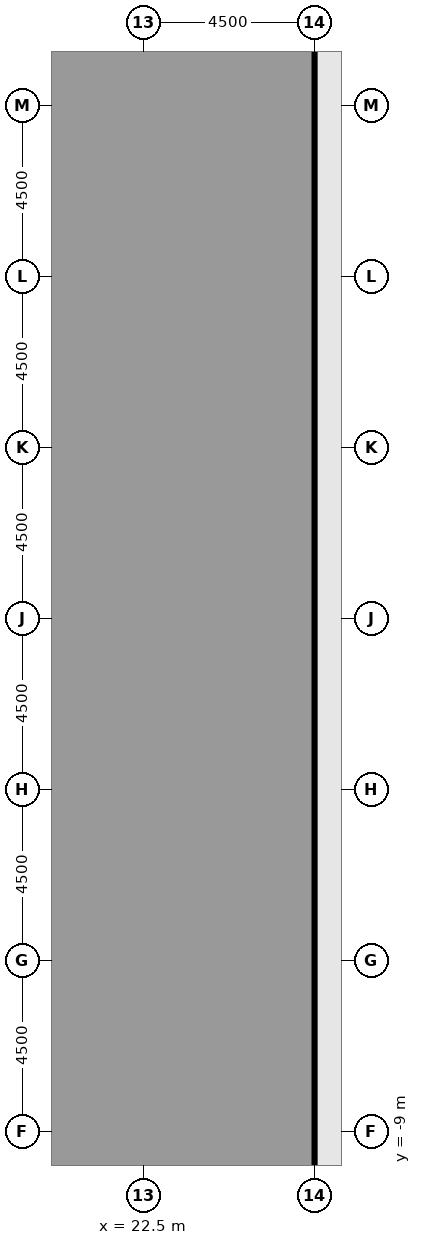
"""IFC4 building model, lengths in metres.
Left out: names, types, materials, properties, quantities, classifications, styles, units other than length and angle.
Written with IfcOpenShell. Run it as: python <this file> out.ifc"""

import sys

from ifc_helpers import new_model, si_unit, direction, frame, frame_2d, origin, origin_2d, place, context, subcontext, project, spatial, rectangle, extrude, element, fill, save


model = new_model("IFC4")
c1 = context("Model", 3, precision=1e-05, world=origin(), true_north=direction((0.0, 1.0)))
c2 = subcontext(c1, "Body", "Model", "MODEL_VIEW")
j1 = project(units=[si_unit("LENGTHUNIT", "METRE"), si_unit("PLANEANGLEUNIT", "RADIAN")], contexts=[c1])
p1 = place(None, origin())
s1 = spatial("IfcSite", under=j1, at=p1, CompositionType="ELEMENT")
p2 = place(p1, origin())
s2 = spatial("IfcBuilding", under=s1, at=p2, CompositionType="ELEMENT")
p3 = place(p2, frame((0.0, 0.0, 7.2)))
s3 = spatial("IfcBuildingStorey", under=s2, at=p3, CompositionType="ELEMENT", Elevation=7.2)
for number, where, z_axis, x_axis in (
    (1, (27.0, -9.0, -0.45), (0.0, 0.0, 1.0), (1.0, 0.0, 0.0)),
    (2, (27.0, -4.5, -0.45), (0.0, 0.0, 1.0), (1.0, 0.0, 0.0)),
    (3, (27.0, 0.0, -0.45), (0.0, 0.0, 1.0), (1.0, 0.0, 0.0)),
    (4, (27.0, 4.5, -0.45), (0.0, 0.0, 1.0), (1.0, 0.0, 0.0)),
    (5, (27.0, 9.0, -0.45), (0.0, 0.0, 1.0), (1.0, 0.0, 0.0)),
    (6, (27.0, 13.5, -0.45), (0.0, 0.0, 1.0), (1.0, 0.0, 0.0)),
    (7, (27.0, 18.0, -0.45), (0.0, 0.0, 1.0), (1.0, 0.0, 0.0)),
):
    element("IfcColumn", number, at=place(p3, frame(where, z_axis=z_axis, x_axis=x_axis)), inside=s3, PredefinedType="COLUMN", context=c2, shape_type="SweptSolid", body=[
        extrude(rectangle(XDim=1.4, YDim=1.4, at=origin_2d()), origin(), (0.0, 0.0, 1.0), 4.55),
    ])
for number, where, z_axis, x_axis in (
    (8, (22.5, -9.0, 0.0), (0.0, 0.0, 1.0), (1.0, 0.0, 0.0)),
    (9, (22.5, 0.0, 0.0), (0.0, 0.0, 1.0), (1.0, 0.0, 0.0)),
    (10, (22.5, 9.0, 0.0), (0.0, 0.0, 1.0), (1.0, 0.0, 0.0)),
    (11, (22.5, 18.0, 0.0), (0.0, 0.0, 1.0), (1.0, 0.0, 0.0)),
):
    element("IfcColumn", number, at=place(p3, frame(where, z_axis=z_axis, x_axis=x_axis)), inside=s3, PredefinedType="COLUMN", context=c2, shape_type="SweptSolid", body=[
        extrude(rectangle(XDim=1.6, YDim=1.6, at=origin_2d()), origin(), (0.0, 0.0, 1.0), 4.1),
    ])
p4 = place(p3, frame((27.0, -9.7, 0.0), z_axis=(0.0, 0.0, 1.0), x_axis=(0.0, -1.0, 0.0)))
e12 = element("IfcWall", 12, at=p4, inside=s3, PredefinedType="SOLIDWALL", context=c2, shape_type="SweptSolid", body=[
    extrude(rectangle(XDim=3.1, YDim=0.3, at=frame_2d((1.55, 0.0))), origin(), (0.0, 0.0, 1.0), 2.75),
])
p5 = place(p4, frame((0.475, 0.0, 0.8)))
e13 = element("IfcOpeningElement", 13, at=p5, cuts=e12, PredefinedType="OPENING", context=c2, shape_type="SweptSolid", body=[
    extrude(rectangle(XDim=1.2, YDim=1.7, at=frame_2d((0.6, 0.85))), frame((0.0, 0.16, 0.0), z_axis=(0.0, -1.0, 0.0), x_axis=(1.0, 0.0, 0.0)), (0.0, 0.0, 1.0), 0.32),
])
p6 = place(p3, frame((27.0, -5.2, 0.0), z_axis=(0.0, 0.0, 1.0), x_axis=(0.0, -1.0, 0.0)))
e14 = element("IfcWall", 14, at=p6, inside=s3, PredefinedType="SOLIDWALL", context=c2, shape_type="SweptSolid", body=[
    extrude(rectangle(XDim=3.1, YDim=0.3, at=frame_2d((1.55, 0.0))), origin(), (0.0, 0.0, 1.0), 2.75),
])
p7 = place(p6, frame((0.35, 0.0, 0.8)))
e15 = element("IfcOpeningElement", 15, at=p7, cuts=e14, PredefinedType="OPENING", context=c2, shape_type="SweptSolid", body=[
    extrude(rectangle(XDim=2.4, YDim=1.7, at=frame_2d((1.2, 0.85))), frame((0.0, 0.16, 0.0), z_axis=(0.0, -1.0, 0.0), x_axis=(1.0, 0.0, 0.0)), (0.0, 0.0, 1.0), 0.32),
])
p8 = place(p3, frame((27.0, -0.7, 0.0), z_axis=(0.0, 0.0, 1.0), x_axis=(0.0, -1.0, 0.0)))
e16 = element("IfcWall", 16, at=p8, inside=s3, PredefinedType="SOLIDWALL", context=c2, shape_type="SweptSolid", body=[
    extrude(rectangle(XDim=3.1, YDim=0.3, at=frame_2d((1.55, 0.0))), origin(), (0.0, 0.0, 1.0), 2.75),
])
p9 = place(p8, frame((0.35, 0.0, 0.8)))
e17 = element("IfcOpeningElement", 17, at=p9, cuts=e16, PredefinedType="OPENING", context=c2, shape_type="SweptSolid", body=[
    extrude(rectangle(XDim=2.4, YDim=1.7, at=frame_2d((1.2, 0.85))), frame((0.0, 0.16, 0.0), z_axis=(0.0, -1.0, 0.0), x_axis=(1.0, 0.0, 0.0)), (0.0, 0.0, 1.0), 0.32),
])
p10 = place(p3, frame((27.0, 3.8, 0.0), z_axis=(0.0, 0.0, 1.0), x_axis=(0.0, -1.0, 0.0)))
e18 = element("IfcWall", 18, at=p10, inside=s3, PredefinedType="SOLIDWALL", context=c2, shape_type="SweptSolid", body=[
    extrude(rectangle(XDim=3.1, YDim=0.3, at=frame_2d((1.55, 0.0))), origin(), (0.0, 0.0, 1.0), 2.75),
])
p11 = place(p10, frame((0.35, 0.0, 0.8)))
e19 = element("IfcOpeningElement", 19, at=p11, cuts=e18, PredefinedType="OPENING", context=c2, shape_type="SweptSolid", body=[
    extrude(rectangle(XDim=2.4, YDim=1.7, at=frame_2d((1.2, 0.85))), frame((0.0, 0.16, 0.0), z_axis=(0.0, -1.0, 0.0), x_axis=(1.0, 0.0, 0.0)), (0.0, 0.0, 1.0), 0.32),
])
p12 = place(p3, frame((27.0, 8.3, 0.0), z_axis=(0.0, 0.0, 1.0), x_axis=(0.0, -1.0, 0.0)))
e20 = element("IfcWall", 20, at=p12, inside=s3, PredefinedType="SOLIDWALL", context=c2, shape_type="SweptSolid", body=[
    extrude(rectangle(XDim=3.1, YDim=0.3, at=frame_2d((1.55, 0.0))), origin(), (0.0, 0.0, 1.0), 2.75),
])
p13 = place(p12, frame((0.35, 0.0, 0.8)))
e21 = element("IfcOpeningElement", 21, at=p13, cuts=e20, PredefinedType="OPENING", context=c2, shape_type="SweptSolid", body=[
    extrude(rectangle(XDim=2.4, YDim=1.7, at=frame_2d((1.2, 0.85))), frame((0.0, 0.16, 0.0), z_axis=(0.0, -1.0, 0.0), x_axis=(1.0, 0.0, 0.0)), (0.0, 0.0, 1.0), 0.32),
])
p14 = place(p3, frame((27.0, 12.8, 0.0), z_axis=(0.0, 0.0, 1.0), x_axis=(0.0, -1.0, 0.0)))
e22 = element("IfcWall", 22, at=p14, inside=s3, PredefinedType="SOLIDWALL", context=c2, shape_type="SweptSolid", body=[
    extrude(rectangle(XDim=3.1, YDim=0.3, at=frame_2d((1.55, 0.0))), origin(), (0.0, 0.0, 1.0), 2.75),
])
p15 = place(p14, frame((0.35, 0.0, 0.8)))
e23 = element("IfcOpeningElement", 23, at=p15, cuts=e22, PredefinedType="OPENING", context=c2, shape_type="SweptSolid", body=[
    extrude(rectangle(XDim=2.4, YDim=1.7, at=frame_2d((1.2, 0.85))), frame((0.0, 0.16, 0.0), z_axis=(0.0, -1.0, 0.0), x_axis=(1.0, 0.0, 0.0)), (0.0, 0.0, 1.0), 0.32),
])
p16 = place(p3, frame((27.0, 17.3, 0.0), z_axis=(0.0, 0.0, 1.0), x_axis=(0.0, -1.0, 0.0)))
e24 = element("IfcWall", 24, at=p16, inside=s3, PredefinedType="SOLIDWALL", context=c2, shape_type="SweptSolid", body=[
    extrude(rectangle(XDim=3.1, YDim=0.3, at=frame_2d((1.55, 0.0))), origin(), (0.0, 0.0, 1.0), 2.75),
])
p17 = place(p16, frame((1.05, 0.0, 0.0)))
e25 = element("IfcOpeningElement", 25, at=p17, cuts=e24, PredefinedType="OPENING", context=c2, shape_type="SweptSolid", body=[
    extrude(rectangle(XDim=1.0, YDim=2.2, at=frame_2d((0.5, 1.1))), frame((0.0, 0.16, 0.0), z_axis=(0.0, -1.0, 0.0), x_axis=(1.0, 0.0, 0.0)), (0.0, 0.0, 1.0), 0.32),
])
p18 = place(p3, frame((27.0, 21.8, 0.0), z_axis=(0.0, 0.0, 1.0), x_axis=(0.0, -1.0, 0.0)))
e26 = element("IfcWall", 26, at=p18, inside=s3, PredefinedType="SOLIDWALL", context=c2, shape_type="SweptSolid", body=[
    extrude(rectangle(XDim=3.1, YDim=0.3, at=frame_2d((1.55, 0.0))), origin(), (0.0, 0.0, 1.0), 2.75),
])
p19 = place(p18, frame((0.575, 0.0, 0.8)))
e27 = element("IfcOpeningElement", 27, at=p19, cuts=e26, PredefinedType="OPENING", context=c2, shape_type="SweptSolid", body=[
    extrude(rectangle(XDim=2.4, YDim=1.7, at=frame_2d((1.2, 0.85))), frame((0.0, 0.16, 0.0), z_axis=(0.0, -1.0, 0.0), x_axis=(1.0, 0.0, 0.0)), (0.0, 0.0, 1.0), 0.32),
])
p20 = place(p3, frame((21.0, 18.5, 0.0), z_axis=(0.0, 0.0, 1.0), x_axis=(0.0, -1.0, 0.0)))
e28 = element("IfcWall", 28, at=p20, inside=s3, PredefinedType="PARTITIONING", context=c2, shape_type="SweptSolid", body=[
    extrude(rectangle(XDim=27.5, YDim=0.2, at=frame_2d((13.75, 0.0))), origin(), (0.0, 0.0, 1.0), 3.65),
])
p21 = place(p20, frame((21.9, 0.0, 0.0)))
e29 = element("IfcOpeningElement", 29, at=p21, cuts=e28, PredefinedType="OPENING", context=c2, shape_type="SweptSolid", body=[
    extrude(rectangle(XDim=1.0, YDim=2.1, at=frame_2d((0.5, 1.05))), frame((0.0, 0.11, 0.0), z_axis=(0.0, -1.0, 0.0), x_axis=(1.0, 0.0, 0.0)), (0.0, 0.0, 1.0), 0.22),
])
p22 = place(p20, frame((10.4, 0.0, 0.0)))
e30 = element("IfcOpeningElement", 30, at=p22, cuts=e28, PredefinedType="OPENING", context=c2, shape_type="SweptSolid", body=[
    extrude(rectangle(XDim=1.0, YDim=2.1, at=frame_2d((0.5, 1.05))), frame((0.0, 0.11, 0.0), z_axis=(0.0, -1.0, 0.0), x_axis=(1.0, 0.0, 0.0)), (0.0, 0.0, 1.0), 0.22),
])
p23 = place(p3, frame((21.0, -9.0, 0.0), z_axis=(0.0, 0.0, 1.0), x_axis=(1.0, 0.0, 0.0)))
e31 = element("IfcWall", 31, at=p23, inside=s3, PredefinedType="PARTITIONING", context=c2, shape_type="SweptSolid", body=[
    extrude(rectangle(XDim=0.7, YDim=0.2, at=frame_2d((0.35, 0.0))), origin(), (0.0, 0.0, 1.0), 3.65),
])
p24 = place(p3, frame((23.3, -9.0, 0.0), z_axis=(0.0, 0.0, 1.0), x_axis=(1.0, 0.0, 0.0)))
e32 = element("IfcWall", 32, at=p24, inside=s3, PredefinedType="PARTITIONING", context=c2, shape_type="SweptSolid", body=[
    extrude(rectangle(XDim=3.0, YDim=0.2, at=frame_2d((1.5, 0.0))), origin(), (0.0, 0.0, 1.0), 3.65),
])
p25 = place(p3, frame((21.0, 0.0, 0.0), z_axis=(0.0, 0.0, 1.0), x_axis=(1.0, 0.0, 0.0)))
e33 = element("IfcWall", 33, at=p25, inside=s3, PredefinedType="PARTITIONING", context=c2, shape_type="SweptSolid", body=[
    extrude(rectangle(XDim=0.7, YDim=0.2, at=frame_2d((0.35, 0.0))), origin(), (0.0, 0.0, 1.0), 3.65),
])
p26 = place(p3, frame((23.3, 0.0, 0.0), z_axis=(0.0, 0.0, 1.0), x_axis=(1.0, 0.0, 0.0)))
e34 = element("IfcWall", 34, at=p26, inside=s3, PredefinedType="PARTITIONING", context=c2, shape_type="SweptSolid", body=[
    extrude(rectangle(XDim=3.0, YDim=0.2, at=frame_2d((1.5, 0.0))), origin(), (0.0, 0.0, 1.0), 3.65),
])
p27 = place(p3, frame((21.0, 13.5, 0.0), z_axis=(0.0, 0.0, 1.0), x_axis=(1.0, 0.0, 0.0)))
e35 = element("IfcWall", 35, at=p27, inside=s3, PredefinedType="PARTITIONING", context=c2, shape_type="SweptSolid", body=[
    extrude(rectangle(XDim=5.3, YDim=0.2, at=frame_2d((2.65, 0.0))), origin(), (0.0, 0.0, 1.0), 3.65),
])
p28 = place(p3, frame((21.0, 18.5, 0.0), z_axis=(0.0, 0.0, 1.0), x_axis=(1.0, 0.0, 0.0)))
e36 = element("IfcWall", 36, at=p28, inside=s3, PredefinedType="PARTITIONING", context=c2, shape_type="SweptSolid", body=[
    extrude(rectangle(XDim=0.7, YDim=0.2, at=frame_2d((0.35, 0.0))), origin(), (0.0, 0.0, 1.0), 3.65),
])
p29 = place(p3, frame((26.3, 18.5, 0.0), z_axis=(0.0, 0.0, 1.0), x_axis=(-1.0, 0.0, 0.0)))
e37 = element("IfcWall", 37, at=p29, inside=s3, PredefinedType="PARTITIONING", context=c2, shape_type="SweptSolid", body=[
    extrude(rectangle(XDim=3.0, YDim=0.2, at=frame_2d((1.5, 0.0))), origin(), (0.0, 0.0, 1.0), 3.65),
])
p30 = place(p29, frame((1.7, 0.0, 0.0)))
e38 = element("IfcOpeningElement", 38, at=p30, cuts=e37, PredefinedType="OPENING", context=c2, shape_type="SweptSolid", body=[
    extrude(rectangle(XDim=1.0, YDim=2.1, at=frame_2d((0.5, 1.05))), frame((0.0, 0.11, 0.0), z_axis=(0.0, -1.0, 0.0), x_axis=(1.0, 0.0, 0.0)), (0.0, 0.0, 1.0), 0.22),
])
p31 = place(p7, origin())
e39 = element("IfcWindow", 39, at=p31, inside=s3, PartitioningType="SINGLE_PANEL", PredefinedType="WINDOW", context=c2, shape_type="SweptSolid", body=[
    extrude(rectangle(XDim=2.4, YDim=1.7, at=frame_2d((1.2, 0.85))), frame((0.0, 0.03, 0.0), z_axis=(0.0, -1.0, 0.0), x_axis=(1.0, 0.0, 0.0)), (0.0, 0.0, 1.0), 0.06),
])
fill(e15, e39)
p32 = place(p9, origin())
e40 = element("IfcWindow", 40, at=p32, inside=s3, PartitioningType="SINGLE_PANEL", PredefinedType="WINDOW", context=c2, shape_type="SweptSolid", body=[
    extrude(rectangle(XDim=2.4, YDim=1.7, at=frame_2d((1.2, 0.85))), frame((0.0, 0.03, 0.0), z_axis=(0.0, -1.0, 0.0), x_axis=(1.0, 0.0, 0.0)), (0.0, 0.0, 1.0), 0.06),
])
fill(e17, e40)
p33 = place(p11, origin())
e41 = element("IfcWindow", 41, at=p33, inside=s3, PartitioningType="SINGLE_PANEL", PredefinedType="WINDOW", context=c2, shape_type="SweptSolid", body=[
    extrude(rectangle(XDim=2.4, YDim=1.7, at=frame_2d((1.2, 0.85))), frame((0.0, 0.03, 0.0), z_axis=(0.0, -1.0, 0.0), x_axis=(1.0, 0.0, 0.0)), (0.0, 0.0, 1.0), 0.06),
])
fill(e19, e41)
p34 = place(p13, origin())
e42 = element("IfcWindow", 42, at=p34, inside=s3, PartitioningType="SINGLE_PANEL", PredefinedType="WINDOW", context=c2, shape_type="SweptSolid", body=[
    extrude(rectangle(XDim=2.4, YDim=1.7, at=frame_2d((1.2, 0.85))), frame((0.0, 0.03, 0.0), z_axis=(0.0, -1.0, 0.0), x_axis=(1.0, 0.0, 0.0)), (0.0, 0.0, 1.0), 0.06),
])
fill(e21, e42)
p35 = place(p15, origin())
e43 = element("IfcWindow", 43, at=p35, inside=s3, PartitioningType="SINGLE_PANEL", PredefinedType="WINDOW", context=c2, shape_type="SweptSolid", body=[
    extrude(rectangle(XDim=2.4, YDim=1.7, at=frame_2d((1.2, 0.85))), frame((0.0, 0.03, 0.0), z_axis=(0.0, -1.0, 0.0), x_axis=(1.0, 0.0, 0.0)), (0.0, 0.0, 1.0), 0.06),
])
fill(e23, e43)
p36 = place(p17, origin())
e44 = element("IfcDoor", 44, at=p36, inside=s3, OperationType="SINGLE_SWING_RIGHT", PredefinedType="DOOR", context=c2, shape_type="SweptSolid", body=[
    extrude(rectangle(XDim=1.0, YDim=2.2, at=frame_2d((0.5, 1.1))), frame((0.0, 0.025, 0.0), z_axis=(0.0, -1.0, 0.0), x_axis=(1.0, 0.0, 0.0)), (0.0, 0.0, 1.0), 0.05),
])
fill(e25, e44)
p37 = place(p19, origin())
e45 = element("IfcWindow", 45, at=p37, inside=s3, PartitioningType="SINGLE_PANEL", PredefinedType="WINDOW", context=c2, shape_type="SweptSolid", body=[
    extrude(rectangle(XDim=2.4, YDim=1.7, at=frame_2d((1.2, 0.85))), frame((0.0, 0.03, 0.0), z_axis=(0.0, -1.0, 0.0), x_axis=(1.0, 0.0, 0.0)), (0.0, 0.0, 1.0), 0.06),
])
fill(e27, e45)
p38 = place(p30, origin())
e46 = element("IfcDoor", 46, at=p38, inside=s3, OperationType="SINGLE_SWING_RIGHT", PredefinedType="DOOR", context=c2, shape_type="SweptSolid", body=[
    extrude(rectangle(XDim=1.0, YDim=2.1, at=frame_2d((0.5, 1.05))), frame((0.0, 0.025, 0.0), z_axis=(0.0, -1.0, 0.0), x_axis=(1.0, 0.0, 0.0)), (0.0, 0.0, 1.0), 0.05),
])
fill(e38, e46)
p39 = place(p21, origin())
e47 = element("IfcDoor", 47, at=p39, inside=s3, OperationType="SINGLE_SWING_RIGHT", PredefinedType="DOOR", context=c2, shape_type="SweptSolid", body=[
    extrude(rectangle(XDim=1.0, YDim=2.1, at=frame_2d((0.5, 1.05))), frame((0.0, 0.025, 0.0), z_axis=(0.0, -1.0, 0.0), x_axis=(1.0, 0.0, 0.0)), (0.0, 0.0, 1.0), 0.05),
])
fill(e29, e47)
p40 = place(p22, origin())
e48 = element("IfcDoor", 48, at=p40, inside=s3, OperationType="SINGLE_SWING_LEFT", PredefinedType="DOOR", context=c2, shape_type="SweptSolid", body=[
    extrude(rectangle(XDim=1.0, YDim=2.1, at=frame_2d((0.5, 1.05))), frame((0.0, 0.025, 0.0), z_axis=(0.0, -1.0, 0.0), x_axis=(1.0, 0.0, 0.0)), (0.0, 0.0, 1.0), 0.05),
])
fill(e30, e48)
save(model, sys.argv[1])
